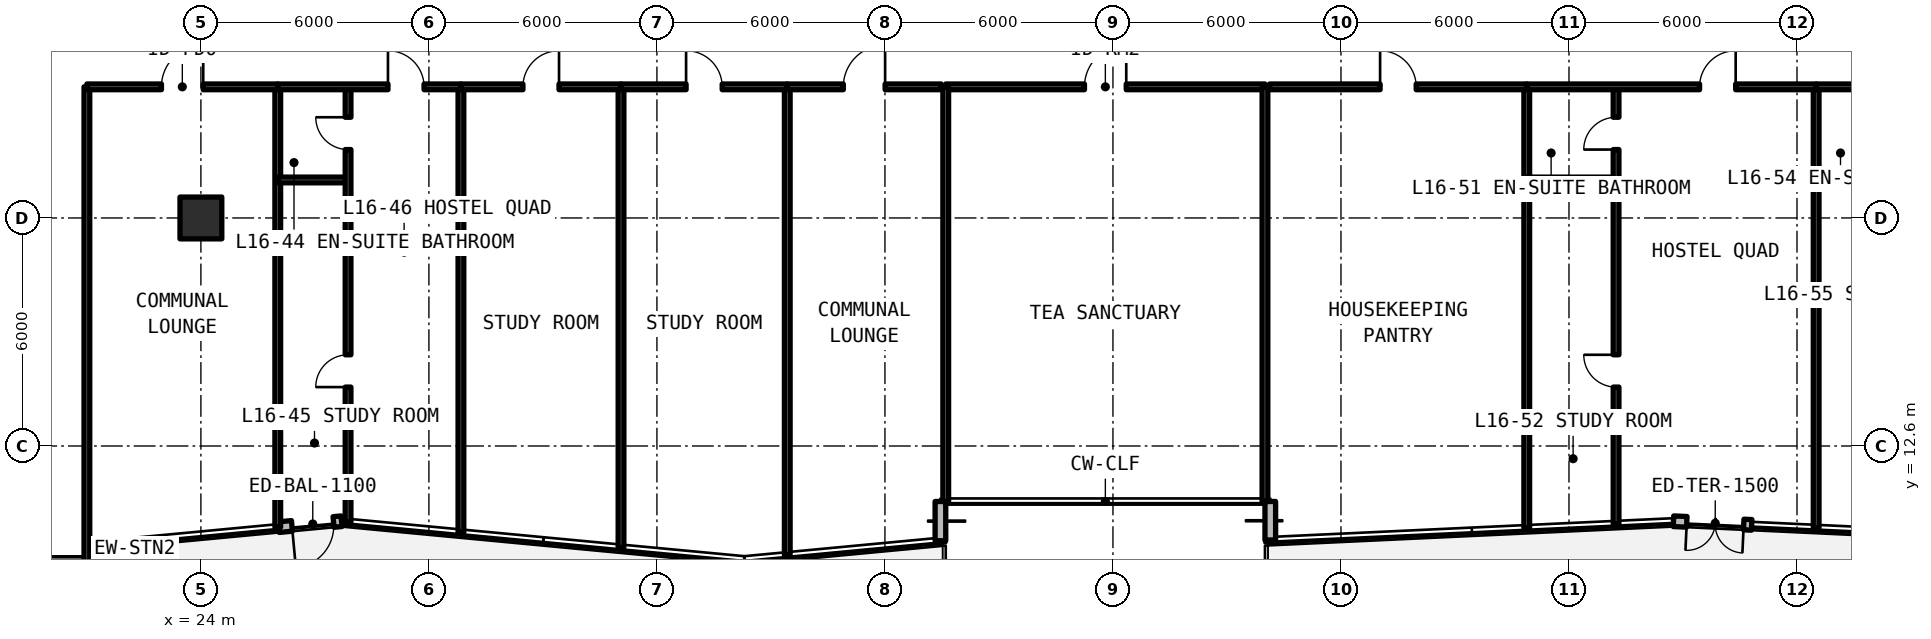
"""IFC4 building model, lengths in metres.
Left out: names, types, materials, properties, quantities, classifications, styles, units other than length and angle.
Written with IfcOpenShell. Run it as: python <this file> out.ifc"""

import sys

from ifc_helpers import new_model, si_unit, direction, frame, frame_2d, origin, origin_2d, place, context, subcontext, project, spatial, rectangle, extrude, element, fill, save


model = new_model("IFC4")
c1 = context("Model", 3, precision=1e-05, world=origin(), true_north=direction((0.0, 1.0)))
c2 = subcontext(c1, "Body", "Model", "MODEL_VIEW")
j1 = project(units=[si_unit("LENGTHUNIT", "METRE"), si_unit("PLANEANGLEUNIT", "RADIAN")], contexts=[c1])
p1 = place(None, origin())
s1 = spatial("IfcSite", under=j1, at=p1, CompositionType="ELEMENT")
p2 = place(p1, origin())
s2 = spatial("IfcBuilding", under=s1, at=p2, CompositionType="ELEMENT")
p3 = place(p2, frame((0.0, 0.0, 58.74)))
s3 = spatial("IfcBuildingStorey", under=s2, at=p3, CompositionType="ELEMENT", Elevation=58.74)
p4 = place(p3, frame((24.0, 18.6, 0.0), z_axis=(0.0, 0.0, 1.0), x_axis=(1.0, 0.0, 0.0)))
e1 = element("IfcColumn", 1, at=p4, inside=s3, PredefinedType="COLUMN", context=c2, shape_type="SweptSolid", body=[
    extrude(rectangle(XDim=1.1, YDim=1.1, at=origin_2d()), origin(), (0.0, 0.0, 1.0), 3.63),
])
p5 = place(p3, frame((22.26, 7.74, 0.0), z_axis=(0.0, 0.0, 1.0), x_axis=(0.0, 1.0, 0.0)))
e2 = element("IfcWall", 2, at=p5, inside=s3, PredefinedType="SOLIDWALL", context=c2, shape_type="SweptSolid", body=[
    extrude(rectangle(XDim=2.367, YDim=0.28, at=frame_2d((1.184, 0.0))), origin(), (0.0, 0.0, 1.0), 3.41),
])
p6 = place(p5, frame((0.759, 0.0, 0.78)))
e3 = element("IfcOpeningElement", 3, at=p6, cuts=e2, PredefinedType="OPENING", context=c2, shape_type="SweptSolid", body=[
    extrude(rectangle(XDim=0.85, YDim=1.65, at=frame_2d((0.425, 0.825))), frame((0.0, 0.15, 0.0), z_axis=(0.0, -1.0, 0.0), x_axis=(1.0, 0.0, 0.0)), (0.0, 0.0, 1.0), 0.3),
])
p7 = place(p3, frame((26.047, 10.465, 0.0), z_axis=(0.0, 0.0, 1.0), x_axis=(0.995573792115, 0.093983107278, 0.0)))
e4 = element("IfcWall", 4, at=p7, inside=s3, PredefinedType="SOLIDWALL", context=c2, shape_type="SweptSolid", body=[
    extrude(rectangle(XDim=1.66, YDim=0.28, at=frame_2d((0.83, 0.0))), origin(), (0.0, 0.0, 1.0), 3.41),
])
p8 = place(p7, frame((0.35, 0.0, 0.0)))
e5 = element("IfcOpeningElement", 5, at=p8, cuts=e4, PredefinedType="OPENING", context=c2, shape_type="SweptSolid", body=[
    extrude(rectangle(XDim=1.1, YDim=2.15, at=frame_2d((0.55, 1.075))), frame((0.0, 0.15, 0.0), z_axis=(0.0, -1.0, 0.0), x_axis=(1.0, 0.0, 0.0)), (0.0, 0.0, 1.0), 0.3),
])
p9 = place(p3, frame((43.46, 10.107, 0.0), z_axis=(0.0, 0.0, 1.0), x_axis=(0.0, 1.0, 0.0)))
e6 = element("IfcWall", 6, at=p9, inside=s3, PredefinedType="SOLIDWALL", context=c2, shape_type="SweptSolid", body=[
    extrude(rectangle(XDim=1.032, YDim=0.28, at=frame_2d((0.516, 0.0))), origin(), (0.0, 0.0, 1.0), 3.41),
])
p10 = place(p3, frame((52.14, 11.14, 0.0), z_axis=(0.0, 0.0, 1.0), x_axis=(0.0, -1.0, 0.0)))
e7 = element("IfcWall", 7, at=p10, inside=s3, PredefinedType="SOLIDWALL", context=c2, shape_type="SweptSolid", body=[
    extrude(rectangle(XDim=1.013, YDim=0.28, at=frame_2d((0.507, 0.0))), origin(), (0.0, 0.0, 1.0), 3.41),
])
p11 = place(p3, frame((62.75, 10.62, 0.0), z_axis=(0.0, 0.0, 1.0), x_axis=(0.998920341886, -0.04645589916, 0.0)))
e8 = element("IfcWall", 8, at=p11, inside=s3, PredefinedType="SOLIDWALL", context=c2, shape_type="SweptSolid", body=[
    extrude(rectangle(XDim=2.06, YDim=0.28, at=frame_2d((1.03, 0.0))), origin(), (0.0, 0.0, 1.0), 3.41),
])
p12 = place(p11, frame((0.35, 0.0, 0.0)))
e9 = element("IfcOpeningElement", 9, at=p12, cuts=e8, PredefinedType="OPENING", context=c2, shape_type="SweptSolid", body=[
    extrude(rectangle(XDim=1.5, YDim=2.2, at=frame_2d((0.75, 1.1))), frame((0.0, 0.15, 0.0), z_axis=(0.0, -1.0, 0.0), x_axis=(1.0, 0.0, 0.0)), (0.0, 0.0, 1.0), 0.3),
])
p13 = place(p3, frame((16.74, 11.858, 0.0), z_axis=(0.0, 0.0, 1.0), x_axis=(0.707106781187, -0.707106781187, 0.0)))
e10 = element("IfcWall", 10, at=p13, inside=s3, PredefinedType="SOLIDWALL", context=c2, shape_type="SweptSolid", body=[
    extrude(rectangle(XDim=5.824, YDim=0.28, at=frame_2d((2.912, 0.0))), origin(), (0.0, 0.0, 1.0), 3.41),
])
p14 = place(p13, frame((1.212, 0.0, 0.78)))
e11 = element("IfcOpeningElement", 11, at=p14, cuts=e10, PredefinedType="OPENING", context=c2, shape_type="SweptSolid", body=[
    extrude(rectangle(XDim=3.4, YDim=1.66, at=frame_2d((1.7, 0.83))), frame((0.0, 0.15, 0.0), z_axis=(0.0, -1.0, 0.0), x_axis=(1.0, 0.0, 0.0)), (0.0, 0.0, 1.0), 0.3),
])
p15 = place(p3, frame((43.6, 22.05, 0.0), z_axis=(0.0, 0.0, 1.0), x_axis=(1.0, 0.0, 0.0)))
e12 = element("IfcWall", 12, at=p15, inside=s3, PredefinedType="SOLIDWALL", context=c2, shape_type="SweptSolid", body=[
    extrude(rectangle(XDim=8.4, YDim=0.15, at=frame_2d((4.2, 0.0))), origin(), (0.0, 0.0, 1.0), 2.63),
])
p16 = place(p15, frame((3.65, 0.0, 0.0)))
e13 = element("IfcOpeningElement", 13, at=p16, cuts=e12, PredefinedType="OPENING", context=c2, shape_type="SweptSolid", body=[
    extrude(rectangle(XDim=1.1, YDim=2.15, at=frame_2d((0.55, 1.075))), frame((0.0, 0.085, 0.0), z_axis=(0.0, -1.0, 0.0), x_axis=(1.0, 0.0, 0.0)), (0.0, 0.0, 1.0), 0.17),
])
for number, where, z_axis, x_axis in (
    (14, (43.6, 11.14, 0.0), (0.0, 0.0, 1.0), (0.0, 1.0, 0.0)),
    (15, (52.0, 11.14, 0.0), (0.0, 0.0, 1.0), (0.0, 1.0, 0.0)),
):
    element("IfcWall", number, at=place(p3, frame(where, z_axis=z_axis, x_axis=x_axis)), inside=s3, PredefinedType="SOLIDWALL", context=c2, shape_type="SweptSolid", body=[
        extrude(rectangle(XDim=10.91, YDim=0.15, at=frame_2d((5.455, 0.0))), origin(), (0.0, 0.0, 1.0), 2.63),
    ])
p17 = place(p3, frame((21.0, 7.74, 0.0), z_axis=(0.0, 0.0, 1.0), x_axis=(0.0, 1.0, 0.0)))
e16 = element("IfcWall", 16, at=p17, inside=s3, PredefinedType="SOLIDWALL", context=c2, shape_type="SweptSolid", body=[
    extrude(rectangle(XDim=14.31, YDim=0.15, at=frame_2d((7.155, 0.0))), origin(), (0.0, 0.0, 1.0), 2.63),
])
p18 = place(p3, frame((26.023, 10.462, 0.0), z_axis=(0.0, 0.0, 1.0), x_axis=(0.0, 1.0, 0.0)))
e17 = element("IfcWall", 17, at=p18, inside=s3, PredefinedType="SOLIDWALL", context=c2, shape_type="SweptSolid", body=[
    extrude(rectangle(XDim=11.588, YDim=0.15, at=frame_2d((5.794, 0.0))), origin(), (0.0, 0.0, 1.0), 2.63),
])
p19 = place(p3, frame((21.0, 22.05, 0.0), z_axis=(0.0, 0.0, 1.0), x_axis=(1.0, 0.0, 0.0)))
e18 = element("IfcWall", 18, at=p19, inside=s3, PredefinedType="SOLIDWALL", context=c2, shape_type="SweptSolid", body=[
    extrude(rectangle(XDim=5.023, YDim=0.15, at=frame_2d((2.511, 0.0))), origin(), (0.0, 0.0, 1.0), 2.63),
])
p20 = place(p19, frame((1.961, 0.0, 0.0)))
e19 = element("IfcOpeningElement", 19, at=p20, cuts=e18, PredefinedType="OPENING", context=c2, shape_type="SweptSolid", body=[
    extrude(rectangle(XDim=1.1, YDim=2.15, at=frame_2d((0.55, 1.075))), frame((0.0, 0.085, 0.0), z_axis=(0.0, -1.0, 0.0), x_axis=(1.0, 0.0, 0.0)), (0.0, 0.0, 1.0), 0.17),
])
p21 = place(p3, frame((30.843, 10.324, 0.0), z_axis=(0.0, 0.0, 1.0), x_axis=(0.0, 1.0, 0.0)))
e20 = element("IfcWall", 20, at=p21, inside=s3, PredefinedType="SOLIDWALL", context=c2, shape_type="SweptSolid", body=[
    extrude(rectangle(XDim=11.726, YDim=0.15, at=frame_2d((5.863, 0.0))), origin(), (0.0, 0.0, 1.0), 2.63),
])
p22 = place(p3, frame((26.023, 19.6, 0.0), z_axis=(0.0, 0.0, 1.0), x_axis=(1.0, 0.0, 0.0)))
e21 = element("IfcWall", 21, at=p22, inside=s3, PredefinedType="PARTITIONING", context=c2, shape_type="SweptSolid", body=[
    extrude(rectangle(XDim=1.85, YDim=0.15, at=frame_2d((0.925, 0.0))), origin(), (0.0, 0.0, 1.0), 2.63),
])
p23 = place(p3, frame((27.873, 10.604, 0.0), z_axis=(0.0, 0.0, 1.0), x_axis=(0.0, 1.0, 0.0)))
e22 = element("IfcWall", 22, at=p23, inside=s3, PredefinedType="PARTITIONING", context=c2, shape_type="SweptSolid", body=[
    extrude(rectangle(XDim=11.446, YDim=0.15, at=frame_2d((5.723, 0.0))), origin(), (0.0, 0.0, 1.0), 2.63),
])
p24 = place(p23, frame((3.546, 0.0, 0.0)))
e23 = element("IfcOpeningElement", 23, at=p24, cuts=e22, PredefinedType="OPENING", context=c2, shape_type="SweptSolid", body=[
    extrude(rectangle(XDim=0.85, YDim=2.1, at=frame_2d((0.425, 1.05))), frame((0.0, 0.085, 0.0), z_axis=(0.0, -1.0, 0.0), x_axis=(1.0, 0.0, 0.0)), (0.0, 0.0, 1.0), 0.17),
])
p25 = place(p23, frame((9.796, 0.0, 0.0)))
e24 = element("IfcOpeningElement", 24, at=p25, cuts=e22, PredefinedType="OPENING", context=c2, shape_type="SweptSolid", body=[
    extrude(rectangle(XDim=0.85, YDim=2.1, at=frame_2d((0.425, 1.05))), frame((0.0, 0.085, 0.0), z_axis=(0.0, -1.0, 0.0), x_axis=(1.0, 0.0, 0.0)), (0.0, 0.0, 1.0), 0.17),
])
p26 = place(p3, frame((26.023, 22.05, 0.0), z_axis=(0.0, 0.0, 1.0), x_axis=(1.0, 0.0, 0.0)))
e25 = element("IfcWall", 25, at=p26, inside=s3, PredefinedType="SOLIDWALL", context=c2, shape_type="SweptSolid", body=[
    extrude(rectangle(XDim=4.82, YDim=0.15, at=frame_2d((2.41, 0.0))), origin(), (0.0, 0.0, 1.0), 2.63),
])
p27 = place(p26, frame((2.9, 0.0, 0.0)))
e26 = element("IfcOpeningElement", 26, at=p27, cuts=e25, PredefinedType="OPENING", context=c2, shape_type="SweptSolid", body=[
    extrude(rectangle(XDim=0.95, YDim=2.15, at=frame_2d((0.475, 1.075))), frame((0.0, 0.085, 0.0), z_axis=(0.0, -1.0, 0.0), x_axis=(1.0, 0.0, 0.0)), (0.0, 0.0, 1.0), 0.17),
])
p28 = place(p3, frame((35.055, 9.927, 0.0), z_axis=(0.0, 0.0, 1.0), x_axis=(0.0, 1.0, 0.0)))
e27 = element("IfcWall", 27, at=p28, inside=s3, PredefinedType="SOLIDWALL", context=c2, shape_type="SweptSolid", body=[
    extrude(rectangle(XDim=12.123, YDim=0.15, at=frame_2d((6.062, 0.0))), origin(), (0.0, 0.0, 1.0), 2.63),
])
p29 = place(p3, frame((30.843, 22.05, 0.0), z_axis=(0.0, 0.0, 1.0), x_axis=(1.0, 0.0, 0.0)))
e28 = element("IfcWall", 28, at=p29, inside=s3, PredefinedType="SOLIDWALL", context=c2, shape_type="SweptSolid", body=[
    extrude(rectangle(XDim=4.213, YDim=0.15, at=frame_2d((2.106, 0.0))), origin(), (0.0, 0.0, 1.0), 2.63),
])
p30 = place(p29, frame((1.631, 0.0, 0.0)))
e29 = element("IfcOpeningElement", 29, at=p30, cuts=e28, PredefinedType="OPENING", context=c2, shape_type="SweptSolid", body=[
    extrude(rectangle(XDim=0.95, YDim=2.15, at=frame_2d((0.475, 1.075))), frame((0.0, 0.085, 0.0), z_axis=(0.0, -1.0, 0.0), x_axis=(1.0, 0.0, 0.0)), (0.0, 0.0, 1.0), 0.17),
])
p31 = place(p3, frame((39.43, 9.727, 0.0), z_axis=(0.0, 0.0, 1.0), x_axis=(0.0, 1.0, 0.0)))
e30 = element("IfcWall", 30, at=p31, inside=s3, PredefinedType="SOLIDWALL", context=c2, shape_type="SweptSolid", body=[
    extrude(rectangle(XDim=12.323, YDim=0.15, at=frame_2d((6.161, 0.0))), origin(), (0.0, 0.0, 1.0), 2.63),
])
p32 = place(p3, frame((35.055, 22.05, 0.0), z_axis=(0.0, 0.0, 1.0), x_axis=(1.0, 0.0, 0.0)))
e31 = element("IfcWall", 31, at=p32, inside=s3, PredefinedType="SOLIDWALL", context=c2, shape_type="SweptSolid", body=[
    extrude(rectangle(XDim=4.375, YDim=0.15, at=frame_2d((2.187, 0.0))), origin(), (0.0, 0.0, 1.0), 2.63),
])
p33 = place(p32, frame((1.712, 0.0, 0.0)))
e32 = element("IfcOpeningElement", 32, at=p33, cuts=e31, PredefinedType="OPENING", context=c2, shape_type="SweptSolid", body=[
    extrude(rectangle(XDim=0.95, YDim=2.15, at=frame_2d((0.475, 1.075))), frame((0.0, 0.085, 0.0), z_axis=(0.0, -1.0, 0.0), x_axis=(1.0, 0.0, 0.0)), (0.0, 0.0, 1.0), 0.17),
])
p34 = place(p3, frame((39.43, 22.05, 0.0), z_axis=(0.0, 0.0, 1.0), x_axis=(1.0, 0.0, 0.0)))
e33 = element("IfcWall", 33, at=p34, inside=s3, PredefinedType="SOLIDWALL", context=c2, shape_type="SweptSolid", body=[
    extrude(rectangle(XDim=4.05, YDim=0.15, at=frame_2d((2.025, 0.0))), origin(), (0.0, 0.0, 1.0), 2.63),
])
p35 = place(p34, frame((1.475, 0.0, 0.0)))
e34 = element("IfcOpeningElement", 34, at=p35, cuts=e33, PredefinedType="OPENING", context=c2, shape_type="SweptSolid", body=[
    extrude(rectangle(XDim=1.1, YDim=2.15, at=frame_2d((0.55, 1.075))), frame((0.0, 0.085, 0.0), z_axis=(0.0, -1.0, 0.0), x_axis=(1.0, 0.0, 0.0)), (0.0, 0.0, 1.0), 0.17),
])
p36 = place(p3, frame((58.889, 10.441, 0.0), z_axis=(0.0, 0.0, 1.0), x_axis=(0.0, 1.0, 0.0)))
e35 = element("IfcWall", 35, at=p36, inside=s3, PredefinedType="SOLIDWALL", context=c2, shape_type="SweptSolid", body=[
    extrude(rectangle(XDim=11.609, YDim=0.15, at=frame_2d((5.805, 0.0))), origin(), (0.0, 0.0, 1.0), 2.63),
])
p37 = place(p3, frame((52.12, 22.05, 0.0), z_axis=(0.0, 0.0, 1.0), x_axis=(1.0, 0.0, 0.0)))
e36 = element("IfcWall", 36, at=p37, inside=s3, PredefinedType="SOLIDWALL", context=c2, shape_type="SweptSolid", body=[
    extrude(rectangle(XDim=6.769, YDim=0.15, at=frame_2d((3.384, 0.0))), origin(), (0.0, 0.0, 1.0), 2.63),
])
p38 = place(p37, frame((2.909, 0.0, 0.0)))
e37 = element("IfcOpeningElement", 37, at=p38, cuts=e36, PredefinedType="OPENING", context=c2, shape_type="SweptSolid", body=[
    extrude(rectangle(XDim=0.95, YDim=2.15, at=frame_2d((0.475, 1.075))), frame((0.0, 0.085, 0.0), z_axis=(0.0, -1.0, 0.0), x_axis=(1.0, 0.0, 0.0)), (0.0, 0.0, 1.0), 0.17),
])
p39 = place(p3, frame((66.504, 10.446, 0.0), z_axis=(0.0, 0.0, 1.0), x_axis=(0.0, 1.0, 0.0)))
e38 = element("IfcWall", 38, at=p39, inside=s3, PredefinedType="SOLIDWALL", context=c2, shape_type="SweptSolid", body=[
    extrude(rectangle(XDim=11.604, YDim=0.15, at=frame_2d((5.802, 0.0))), origin(), (0.0, 0.0, 1.0), 2.63),
])
p40 = place(p3, frame((58.889, 19.6, 0.0), z_axis=(0.0, 0.0, 1.0), x_axis=(1.0, 0.0, 0.0)))
e39 = element("IfcWall", 39, at=p40, inside=s3, PredefinedType="PARTITIONING", context=c2, shape_type="SweptSolid", body=[
    extrude(rectangle(XDim=2.35, YDim=0.15, at=frame_2d((1.175, 0.0))), origin(), (0.0, 0.0, 1.0), 2.63),
])
p41 = place(p3, frame((61.239, 10.55, 0.0), z_axis=(0.0, 0.0, 1.0), x_axis=(0.0, 1.0, 0.0)))
e40 = element("IfcWall", 40, at=p41, inside=s3, PredefinedType="PARTITIONING", context=c2, shape_type="SweptSolid", body=[
    extrude(rectangle(XDim=11.5, YDim=0.15, at=frame_2d((5.75, 0.0))), origin(), (0.0, 0.0, 1.0), 2.63),
])
p42 = place(p41, frame((3.6, 0.0, 0.0)))
e41 = element("IfcOpeningElement", 41, at=p42, cuts=e40, PredefinedType="OPENING", context=c2, shape_type="SweptSolid", body=[
    extrude(rectangle(XDim=0.85, YDim=2.1, at=frame_2d((0.425, 1.05))), frame((0.0, 0.085, 0.0), z_axis=(0.0, -1.0, 0.0), x_axis=(1.0, 0.0, 0.0)), (0.0, 0.0, 1.0), 0.17),
])
p43 = place(p41, frame((9.85, 0.0, 0.0)))
e42 = element("IfcOpeningElement", 42, at=p43, cuts=e40, PredefinedType="OPENING", context=c2, shape_type="SweptSolid", body=[
    extrude(rectangle(XDim=0.85, YDim=2.1, at=frame_2d((0.425, 1.05))), frame((0.0, 0.085, 0.0), z_axis=(0.0, -1.0, 0.0), x_axis=(1.0, 0.0, 0.0)), (0.0, 0.0, 1.0), 0.17),
])
p44 = place(p3, frame((58.889, 22.05, 0.0), z_axis=(0.0, 0.0, 1.0), x_axis=(1.0, 0.0, 0.0)))
e43 = element("IfcWall", 43, at=p44, inside=s3, PredefinedType="SOLIDWALL", context=c2, shape_type="SweptSolid", body=[
    extrude(rectangle(XDim=7.615, YDim=0.15, at=frame_2d((3.808, 0.0))), origin(), (0.0, 0.0, 1.0), 2.63),
])
p45 = place(p44, frame((4.548, 0.0, 0.0)))
e44 = element("IfcOpeningElement", 44, at=p45, cuts=e43, PredefinedType="OPENING", context=c2, shape_type="SweptSolid", body=[
    extrude(rectangle(XDim=0.95, YDim=2.15, at=frame_2d((0.475, 1.075))), frame((0.0, 0.085, 0.0), z_axis=(0.0, -1.0, 0.0), x_axis=(1.0, 0.0, 0.0)), (0.0, 0.0, 1.0), 0.17),
])
p46 = place(p3, frame((66.504, 19.6, 0.0), z_axis=(0.0, 0.0, 1.0), x_axis=(1.0, 0.0, 0.0)))
e45 = element("IfcWall", 45, at=p46, inside=s3, PredefinedType="PARTITIONING", context=c2, shape_type="SweptSolid", body=[
    extrude(rectangle(XDim=2.35, YDim=0.15, at=frame_2d((1.175, 0.0))), origin(), (0.0, 0.0, 1.0), 2.63),
])
p47 = place(p3, frame((66.504, 22.05, 0.0), z_axis=(0.0, 0.0, 1.0), x_axis=(1.0, 0.0, 0.0)))
e46 = element("IfcWall", 46, at=p47, inside=s3, PredefinedType="SOLIDWALL", context=c2, shape_type="SweptSolid", body=[
    extrude(rectangle(XDim=7.333, YDim=0.15, at=frame_2d((3.667, 0.0))), origin(), (0.0, 0.0, 1.0), 2.63),
])
p48 = place(p47, frame((4.406, 0.0, 0.0)))
e47 = element("IfcOpeningElement", 47, at=p48, cuts=e46, PredefinedType="OPENING", context=c2, shape_type="SweptSolid", body=[
    extrude(rectangle(XDim=0.95, YDim=2.15, at=frame_2d((0.475, 1.075))), frame((0.0, 0.085, 0.0), z_axis=(0.0, -1.0, 0.0), x_axis=(1.0, 0.0, 0.0)), (0.0, 0.0, 1.0), 0.17),
])
p49 = place(p8, frame((1.1, 0.0, 0.0), z_axis=(0.0, 0.0, 1.0), x_axis=(-1.0, 0.0, 0.0)))
e48 = element("IfcDoor", 48, at=p49, inside=s3, OperationType="SINGLE_SWING_RIGHT", PredefinedType="DOOR", context=c2, shape_type="SweptSolid", body=[
    extrude(rectangle(XDim=1.1, YDim=2.15, at=frame_2d((0.55, 1.075))), frame((0.0, 0.025, 0.0), z_axis=(0.0, -1.0, 0.0), x_axis=(1.0, 0.0, 0.0)), (0.0, 0.0, 1.0), 0.05),
])
fill(e5, e48)
p50 = place(p12, frame((1.5, 0.0, 0.0), z_axis=(0.0, 0.0, 1.0), x_axis=(-1.0, 0.0, 0.0)))
e49 = element("IfcDoor", 49, at=p50, inside=s3, OperationType="SINGLE_SWING_LEFT", PredefinedType="DOOR", context=c2, shape_type="SweptSolid", body=[
    extrude(rectangle(XDim=1.5, YDim=2.2, at=frame_2d((0.75, 1.1))), frame((0.0, 0.025, 0.0), z_axis=(0.0, -1.0, 0.0), x_axis=(1.0, 0.0, 0.0)), (0.0, 0.0, 1.0), 0.05),
])
fill(e9, e49)
p51 = place(p16, origin())
e50 = element("IfcDoor", 50, at=p51, inside=s3, OperationType="SINGLE_SWING_RIGHT", PredefinedType="DOOR", context=c2, shape_type="SweptSolid", body=[
    extrude(rectangle(XDim=1.1, YDim=2.15, at=frame_2d((0.55, 1.075))), frame((0.0, 0.025, 0.0), z_axis=(0.0, -1.0, 0.0), x_axis=(1.0, 0.0, 0.0)), (0.0, 0.0, 1.0), 0.05),
])
fill(e13, e50)
p52 = place(p20, origin())
e51 = element("IfcDoor", 51, at=p52, inside=s3, OperationType="SINGLE_SWING_RIGHT", PredefinedType="DOOR", context=c2, shape_type="SweptSolid", body=[
    extrude(rectangle(XDim=1.1, YDim=2.15, at=frame_2d((0.55, 1.075))), frame((0.0, 0.025, 0.0), z_axis=(0.0, -1.0, 0.0), x_axis=(1.0, 0.0, 0.0)), (0.0, 0.0, 1.0), 0.05),
])
fill(e19, e51)
p53 = place(p24, origin())
e52 = element("IfcDoor", 52, at=p53, inside=s3, OperationType="SINGLE_SWING_LEFT", PredefinedType="DOOR", context=c2, shape_type="SweptSolid", body=[
    extrude(rectangle(XDim=0.85, YDim=2.1, at=frame_2d((0.425, 1.05))), frame((0.0, 0.025, 0.0), z_axis=(0.0, -1.0, 0.0), x_axis=(1.0, 0.0, 0.0)), (0.0, 0.0, 1.0), 0.05),
])
fill(e23, e52)
p54 = place(p25, origin())
e53 = element("IfcDoor", 53, at=p54, inside=s3, OperationType="SINGLE_SWING_RIGHT", PredefinedType="DOOR", context=c2, shape_type="SweptSolid", body=[
    extrude(rectangle(XDim=0.85, YDim=2.1, at=frame_2d((0.425, 1.05))), frame((0.0, 0.025, 0.0), z_axis=(0.0, -1.0, 0.0), x_axis=(1.0, 0.0, 0.0)), (0.0, 0.0, 1.0), 0.05),
])
fill(e24, e53)
p55 = place(p27, origin())
e54 = element("IfcDoor", 54, at=p55, inside=s3, OperationType="SINGLE_SWING_LEFT", PredefinedType="DOOR", context=c2, shape_type="SweptSolid", body=[
    extrude(rectangle(XDim=0.95, YDim=2.15, at=frame_2d((0.475, 1.075))), frame((0.0, 0.025, 0.0), z_axis=(0.0, -1.0, 0.0), x_axis=(1.0, 0.0, 0.0)), (0.0, 0.0, 1.0), 0.05),
])
fill(e26, e54)
p56 = place(p30, origin())
e55 = element("IfcDoor", 55, at=p56, inside=s3, OperationType="SINGLE_SWING_RIGHT", PredefinedType="DOOR", context=c2, shape_type="SweptSolid", body=[
    extrude(rectangle(XDim=0.95, YDim=2.15, at=frame_2d((0.475, 1.075))), frame((0.0, 0.025, 0.0), z_axis=(0.0, -1.0, 0.0), x_axis=(1.0, 0.0, 0.0)), (0.0, 0.0, 1.0), 0.05),
])
fill(e29, e55)
p57 = place(p33, origin())
e56 = element("IfcDoor", 56, at=p57, inside=s3, OperationType="SINGLE_SWING_LEFT", PredefinedType="DOOR", context=c2, shape_type="SweptSolid", body=[
    extrude(rectangle(XDim=0.95, YDim=2.15, at=frame_2d((0.475, 1.075))), frame((0.0, 0.025, 0.0), z_axis=(0.0, -1.0, 0.0), x_axis=(1.0, 0.0, 0.0)), (0.0, 0.0, 1.0), 0.05),
])
fill(e32, e56)
p58 = place(p35, origin())
e57 = element("IfcDoor", 57, at=p58, inside=s3, OperationType="SINGLE_SWING_RIGHT", PredefinedType="DOOR", context=c2, shape_type="SweptSolid", body=[
    extrude(rectangle(XDim=1.1, YDim=2.15, at=frame_2d((0.55, 1.075))), frame((0.0, 0.025, 0.0), z_axis=(0.0, -1.0, 0.0), x_axis=(1.0, 0.0, 0.0)), (0.0, 0.0, 1.0), 0.05),
])
fill(e34, e57)
p59 = place(p38, origin())
e58 = element("IfcDoor", 58, at=p59, inside=s3, OperationType="SINGLE_SWING_LEFT", PredefinedType="DOOR", context=c2, shape_type="SweptSolid", body=[
    extrude(rectangle(XDim=0.95, YDim=2.15, at=frame_2d((0.475, 1.075))), frame((0.0, 0.025, 0.0), z_axis=(0.0, -1.0, 0.0), x_axis=(1.0, 0.0, 0.0)), (0.0, 0.0, 1.0), 0.05),
])
fill(e37, e58)
p60 = place(p42, origin())
e59 = element("IfcDoor", 59, at=p60, inside=s3, OperationType="SINGLE_SWING_RIGHT", PredefinedType="DOOR", context=c2, shape_type="SweptSolid", body=[
    extrude(rectangle(XDim=0.85, YDim=2.1, at=frame_2d((0.425, 1.05))), frame((0.0, 0.025, 0.0), z_axis=(0.0, -1.0, 0.0), x_axis=(1.0, 0.0, 0.0)), (0.0, 0.0, 1.0), 0.05),
])
fill(e41, e59)
p61 = place(p43, origin())
e60 = element("IfcDoor", 60, at=p61, inside=s3, OperationType="SINGLE_SWING_LEFT", PredefinedType="DOOR", context=c2, shape_type="SweptSolid", body=[
    extrude(rectangle(XDim=0.85, YDim=2.1, at=frame_2d((0.425, 1.05))), frame((0.0, 0.025, 0.0), z_axis=(0.0, -1.0, 0.0), x_axis=(1.0, 0.0, 0.0)), (0.0, 0.0, 1.0), 0.05),
])
fill(e42, e60)
p62 = place(p45, origin())
e61 = element("IfcDoor", 61, at=p62, inside=s3, OperationType="SINGLE_SWING_RIGHT", PredefinedType="DOOR", context=c2, shape_type="SweptSolid", body=[
    extrude(rectangle(XDim=0.95, YDim=2.15, at=frame_2d((0.475, 1.075))), frame((0.0, 0.025, 0.0), z_axis=(0.0, -1.0, 0.0), x_axis=(1.0, 0.0, 0.0)), (0.0, 0.0, 1.0), 0.05),
])
fill(e44, e61)
save(model, sys.argv[1])
